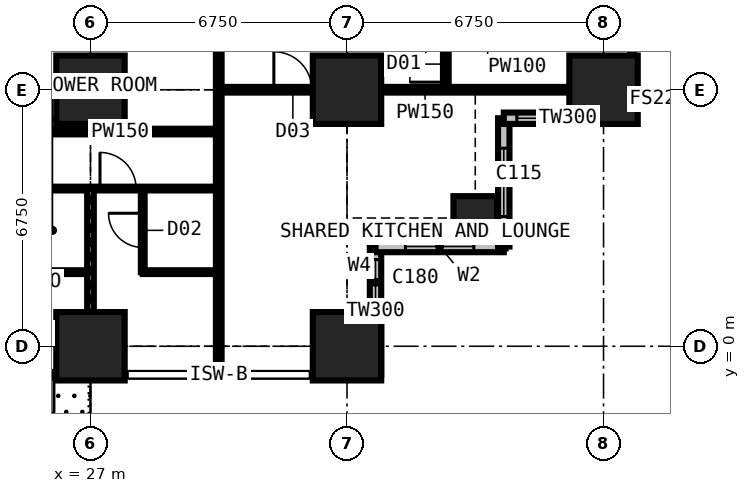
"""IFC4 building model, lengths in metres.
Left out: names, types, materials, properties, quantities, classifications, styles, units other than length and angle.
Written with IfcOpenShell. Run it as: python <this file> out.ifc"""

import sys

from ifc_helpers import new_model, si_unit, direction, frame, frame_2d, origin, origin_2d, place, context, subcontext, project, spatial, rectangle, extrude, element, fill, save


model = new_model("IFC4")
c1 = context("Model", 3, precision=1e-05, world=origin(), true_north=direction((0.0, 1.0)))
c2 = subcontext(c1, "Body", "Model", "MODEL_VIEW")
j1 = project(units=[si_unit("LENGTHUNIT", "METRE"), si_unit("PLANEANGLEUNIT", "RADIAN")], contexts=[c1])
p1 = place(None, origin())
s1 = spatial("IfcSite", under=j1, at=p1, CompositionType="ELEMENT")
p2 = place(p1, origin())
s2 = spatial("IfcBuilding", under=s1, at=p2, CompositionType="ELEMENT")
p3 = place(p2, frame((0.0, 0.0, 105.3)))
s3 = spatial("IfcBuildingStorey", under=s2, at=p3, CompositionType="ELEMENT", Elevation=105.3)
for number, where, z_axis, x_axis in (
    (1, (27.0, 0.0, 0.0), (0.0, 0.0, 1.0), (1.0, 0.0, 0.0)),
    (2, (27.0, 6.75, 0.0), (0.0, 0.0, 1.0), (1.0, 0.0, 0.0)),
    (3, (33.75, 0.0, 0.0), (0.0, 0.0, 1.0), (1.0, 0.0, 0.0)),
    (4, (33.75, 6.75, 0.0), (0.0, 0.0, 1.0), (1.0, 0.0, 0.0)),
):
    element("IfcColumn", number, at=place(p3, frame(where, z_axis=z_axis, x_axis=x_axis)), inside=s3, PredefinedType="COLUMN", context=c2, shape_type="SweptSolid", body=[
        extrude(rectangle(XDim=1.8, YDim=1.8, at=origin_2d()), origin(), (0.0, 0.0, 1.0), 3.6),
    ])
p4 = place(p3, frame((37.125, 3.375, 0.0), z_axis=(0.0, 0.0, 1.0), x_axis=(1.0, 0.0, 0.0)))
e5 = element("IfcColumn", 5, at=p4, inside=s3, PredefinedType="COLUMN", context=c2, shape_type="SweptSolid", body=[
    extrude(rectangle(XDim=1.15, YDim=1.15, at=origin_2d()), origin(), (0.0, 0.0, 1.0), 3.6),
])
p5 = place(p3, frame((40.5, 6.75, 0.0), z_axis=(0.0, 0.0, 1.0), x_axis=(1.0, 0.0, 0.0)))
e6 = element("IfcColumn", 6, at=p5, inside=s3, PredefinedType="COLUMN", context=c2, shape_type="SweptSolid", body=[
    extrude(rectangle(XDim=1.8, YDim=1.8, at=origin_2d()), origin(), (0.0, 0.0, 1.0), 3.6),
])
p6 = place(p3, frame((27.0, -0.75, 0.0), z_axis=(0.0, 0.0, 1.0), x_axis=(-1.0, 0.0, 0.0)))
e7 = element("IfcWall", 7, at=p6, inside=s3, PredefinedType="SOLIDWALL", context=c2, shape_type="SweptSolid", body=[
    extrude(rectangle(XDim=6.75, YDim=0.15, at=frame_2d((3.375, 0.0))), origin(), (0.0, 0.0, 1.0), 3.375),
])
p7 = place(p6, frame((0.962, 0.0, 0.0)))
e8 = element("IfcOpeningElement", 8, at=p7, cuts=e7, PredefinedType="OPENING", context=c2, shape_type="SweptSolid", body=[
    extrude(rectangle(XDim=1.0, YDim=2.2, at=frame_2d((0.5, 1.1))), frame((0.0, 0.085, 0.0), z_axis=(0.0, -1.0, 0.0), x_axis=(1.0, 0.0, 0.0)), (0.0, 0.0, 1.0), 0.17),
])
p8 = place(p6, frame((2.025, 0.0, 0.9)))
e9 = element("IfcOpeningElement", 9, at=p8, cuts=e7, PredefinedType="OPENING", context=c2, shape_type="SweptSolid", body=[
    extrude(rectangle(XDim=1.2, YDim=1.8, at=frame_2d((0.6, 0.9))), frame((0.0, 0.085, 0.0), z_axis=(0.0, -1.0, 0.0), x_axis=(1.0, 0.0, 0.0)), (0.0, 0.0, 1.0), 0.17),
])
p9 = place(p6, frame((4.788, 0.0, 0.0)))
e10 = element("IfcOpeningElement", 10, at=p9, cuts=e7, PredefinedType="OPENING", context=c2, shape_type="SweptSolid", body=[
    extrude(rectangle(XDim=1.0, YDim=2.2, at=frame_2d((0.5, 1.1))), frame((0.0, 0.085, 0.0), z_axis=(0.0, -1.0, 0.0), x_axis=(1.0, 0.0, 0.0)), (0.0, 0.0, 1.0), 0.17),
])
p10 = place(p6, frame((3.525, 0.0, 0.9)))
e11 = element("IfcOpeningElement", 11, at=p10, cuts=e7, PredefinedType="OPENING", context=c2, shape_type="SweptSolid", body=[
    extrude(rectangle(XDim=1.2, YDim=1.8, at=frame_2d((0.6, 0.9))), frame((0.0, 0.085, 0.0), z_axis=(0.0, -1.0, 0.0), x_axis=(1.0, 0.0, 0.0)), (0.0, 0.0, 1.0), 0.17),
])
p11 = place(p3, frame((34.5, -0.75, 0.0), z_axis=(0.0, 0.0, 1.0), x_axis=(0.0, 1.0, 0.0)))
e12 = element("IfcWall", 12, at=p11, inside=s3, PredefinedType="SOLIDWALL", context=c2, shape_type="SweptSolid", body=[
    extrude(rectangle(XDim=3.375, YDim=0.3, at=frame_2d((1.688, 0.0))), origin(), (0.0, 0.0, 1.0), 3.375),
])
p12 = place(p11, frame((1.833, 0.0, 0.9)))
e13 = element("IfcOpeningElement", 13, at=p12, cuts=e12, PredefinedType="OPENING", context=c2, shape_type="SweptSolid", body=[
    extrude(rectangle(XDim=1.2, YDim=1.8, at=frame_2d((0.6, 0.9))), frame((0.0, 0.16, 0.0), z_axis=(0.0, -1.0, 0.0), x_axis=(1.0, 0.0, 0.0)), (0.0, 0.0, 1.0), 0.32),
])
p13 = place(p3, frame((34.5, 2.625, 0.0), z_axis=(0.0, 0.0, 1.0), x_axis=(1.0, 0.0, 0.0)))
e14 = element("IfcWall", 14, at=p13, inside=s3, PredefinedType="SOLIDWALL", context=c2, shape_type="SweptSolid", body=[
    extrude(rectangle(XDim=3.375, YDim=0.3, at=frame_2d((1.688, 0.0))), origin(), (0.0, 0.0, 1.0), 3.375),
])
p14 = place(p13, frame((0.788, 0.0, 0.6)))
e15 = element("IfcOpeningElement", 15, at=p14, cuts=e14, PredefinedType="OPENING", context=c2, shape_type="SweptSolid", body=[
    extrude(rectangle(XDim=1.8, YDim=2.1, at=frame_2d((0.9, 1.05))), frame((0.0, 0.16, 0.0), z_axis=(0.0, -1.0, 0.0), x_axis=(1.0, 0.0, 0.0)), (0.0, 0.0, 1.0), 0.32),
])
p15 = place(p3, frame((37.875, 2.625, 0.0), z_axis=(0.0, 0.0, 1.0), x_axis=(0.0, 1.0, 0.0)))
e16 = element("IfcWall", 16, at=p15, inside=s3, PredefinedType="SOLIDWALL", context=c2, shape_type="SweptSolid", body=[
    extrude(rectangle(XDim=3.375, YDim=0.3, at=frame_2d((1.688, 0.0))), origin(), (0.0, 0.0, 1.0), 3.375),
])
p16 = place(p15, frame((0.788, 0.0, 0.6)))
e17 = element("IfcOpeningElement", 17, at=p16, cuts=e16, PredefinedType="OPENING", context=c2, shape_type="SweptSolid", body=[
    extrude(rectangle(XDim=1.8, YDim=2.1, at=frame_2d((0.9, 1.05))), frame((0.0, 0.16, 0.0), z_axis=(0.0, -1.0, 0.0), x_axis=(1.0, 0.0, 0.0)), (0.0, 0.0, 1.0), 0.32),
])
p17 = place(p3, frame((37.875, 6.0, 0.0), z_axis=(0.0, 0.0, 1.0), x_axis=(1.0, 0.0, 0.0)))
e18 = element("IfcWall", 18, at=p17, inside=s3, PredefinedType="SOLIDWALL", context=c2, shape_type="SweptSolid", body=[
    extrude(rectangle(XDim=3.375, YDim=0.3, at=frame_2d((1.688, 0.0))), origin(), (0.0, 0.0, 1.0), 3.375),
])
p18 = place(p17, frame((0.343, 0.0, 0.9)))
e19 = element("IfcOpeningElement", 19, at=p18, cuts=e18, PredefinedType="OPENING", context=c2, shape_type="SweptSolid", body=[
    extrude(rectangle(XDim=1.2, YDim=1.8, at=frame_2d((0.6, 0.9))), frame((0.0, 0.16, 0.0), z_axis=(0.0, -1.0, 0.0), x_axis=(1.0, 0.0, 0.0)), (0.0, 0.0, 1.0), 0.32),
])
p19 = place(p3, frame((6.75, 4.15, 0.0), z_axis=(0.0, 0.0, 1.0), x_axis=(1.0, 0.0, 0.0)))
e20 = element("IfcWall", 20, at=p19, inside=s3, PredefinedType="PARTITIONING", context=c2, shape_type="SweptSolid", body=[
    extrude(rectangle(XDim=23.625, YDim=0.1, at=frame_2d((11.812, 0.0))), origin(), (0.0, 0.0, 1.0), 3.375),
])
p20 = place(p19, frame((0.2, 0.0, 0.0)))
e21 = element("IfcOpeningElement", 21, at=p20, cuts=e20, PredefinedType="OPENING", context=c2, shape_type="SweptSolid", body=[
    extrude(rectangle(XDim=0.95, YDim=2.2, at=frame_2d((0.475, 1.1))), frame((0.0, 0.06, 0.0), z_axis=(0.0, -1.0, 0.0), x_axis=(1.0, 0.0, 0.0)), (0.0, 0.0, 1.0), 0.12),
])
p21 = place(p19, frame((3.625, 0.0, 0.0)))
e22 = element("IfcOpeningElement", 22, at=p21, cuts=e20, PredefinedType="OPENING", context=c2, shape_type="SweptSolid", body=[
    extrude(rectangle(XDim=0.95, YDim=2.2, at=frame_2d((0.475, 1.1))), frame((0.0, 0.06, 0.0), z_axis=(0.0, -1.0, 0.0), x_axis=(1.0, 0.0, 0.0)), (0.0, 0.0, 1.0), 0.12),
])
p22 = place(p19, frame((6.95, 0.0, 0.0)))
e23 = element("IfcOpeningElement", 23, at=p22, cuts=e20, PredefinedType="OPENING", context=c2, shape_type="SweptSolid", body=[
    extrude(rectangle(XDim=0.95, YDim=2.2, at=frame_2d((0.475, 1.1))), frame((0.0, 0.06, 0.0), z_axis=(0.0, -1.0, 0.0), x_axis=(1.0, 0.0, 0.0)), (0.0, 0.0, 1.0), 0.12),
])
p23 = place(p19, frame((10.375, 0.0, 0.0)))
e24 = element("IfcOpeningElement", 24, at=p23, cuts=e20, PredefinedType="OPENING", context=c2, shape_type="SweptSolid", body=[
    extrude(rectangle(XDim=0.95, YDim=2.2, at=frame_2d((0.475, 1.1))), frame((0.0, 0.06, 0.0), z_axis=(0.0, -1.0, 0.0), x_axis=(1.0, 0.0, 0.0)), (0.0, 0.0, 1.0), 0.12),
])
p24 = place(p19, frame((13.75, 0.0, 0.0)))
e25 = element("IfcOpeningElement", 25, at=p24, cuts=e20, PredefinedType="OPENING", context=c2, shape_type="SweptSolid", body=[
    extrude(rectangle(XDim=0.95, YDim=2.2, at=frame_2d((0.475, 1.1))), frame((0.0, 0.06, 0.0), z_axis=(0.0, -1.0, 0.0), x_axis=(1.0, 0.0, 0.0)), (0.0, 0.0, 1.0), 0.12),
])
p25 = place(p19, frame((17.125, 0.0, 0.0)))
e26 = element("IfcOpeningElement", 26, at=p25, cuts=e20, PredefinedType="OPENING", context=c2, shape_type="SweptSolid", body=[
    extrude(rectangle(XDim=0.95, YDim=2.2, at=frame_2d((0.475, 1.1))), frame((0.0, 0.06, 0.0), z_axis=(0.0, -1.0, 0.0), x_axis=(1.0, 0.0, 0.0)), (0.0, 0.0, 1.0), 0.12),
])
p26 = place(p19, frame((20.5, 0.0, 0.0)))
e27 = element("IfcOpeningElement", 27, at=p26, cuts=e20, PredefinedType="OPENING", context=c2, shape_type="SweptSolid", body=[
    extrude(rectangle(XDim=0.95, YDim=2.2, at=frame_2d((0.475, 1.1))), frame((0.0, 0.06, 0.0), z_axis=(0.0, -1.0, 0.0), x_axis=(1.0, 0.0, 0.0)), (0.0, 0.0, 1.0), 0.12),
])
p27 = place(p3, frame((22.988, 5.65, 0.0), z_axis=(0.0, 0.0, 1.0), x_axis=(1.0, 0.0, 0.0)))
e28 = element("IfcWall", 28, at=p27, inside=s3, PredefinedType="PARTITIONING", context=c2, shape_type="SweptSolid", body=[
    extrude(rectangle(XDim=7.387, YDim=0.15, at=frame_2d((3.694, 0.0))), origin(), (0.0, 0.0, 1.0), 3.375),
])
p28 = place(p27, frame((2.15, 0.0, 0.0)))
e29 = element("IfcOpeningElement", 29, at=p28, cuts=e28, PredefinedType="OPENING", context=c2, shape_type="SweptSolid", body=[
    extrude(rectangle(XDim=0.95, YDim=2.2, at=frame_2d((0.475, 1.1))), frame((0.0, 0.085, 0.0), z_axis=(0.0, -1.0, 0.0), x_axis=(1.0, 0.0, 0.0)), (0.0, 0.0, 1.0), 0.17),
])
p29 = place(p3, frame((25.0, 1.95, 0.0), z_axis=(0.0, 0.0, 1.0), x_axis=(1.0, 0.0, 0.0)))
e30 = element("IfcWall", 30, at=p29, inside=s3, PredefinedType="PARTITIONING", context=c2, shape_type="SweptSolid", body=[
    extrude(rectangle(XDim=2.0, YDim=0.1, at=frame_2d((1.0, 0.0))), origin(), (0.0, 0.0, 1.0), 3.375),
])
p30 = place(p3, frame((27.0, -0.734, 0.0), z_axis=(0.0, 0.0, 1.0), x_axis=(0.0, 1.0, 0.0)))
e31 = element("IfcWall", 31, at=p30, inside=s3, PredefinedType="PARTITIONING", context=c2, shape_type="SweptSolid", body=[
    extrude(rectangle(XDim=4.884, YDim=0.175, at=frame_2d((2.442, 0.0))), origin(), (0.0, 0.0, 1.0), 2.61),
])
p31 = place(p3, frame((28.375, 1.95, 0.0), z_axis=(0.0, 0.0, 1.0), x_axis=(0.0, 1.0, 0.0)))
e32 = element("IfcWall", 32, at=p31, inside=s3, PredefinedType="PARTITIONING", context=c2, shape_type="SweptSolid", body=[
    extrude(rectangle(XDim=2.2, YDim=0.1, at=frame_2d((1.1, 0.0))), origin(), (0.0, 0.0, 1.0), 3.375),
])
p32 = place(p31, frame((0.65, 0.0, 0.0)))
e33 = element("IfcOpeningElement", 33, at=p32, cuts=e32, PredefinedType="OPENING", context=c2, shape_type="SweptSolid", body=[
    extrude(rectangle(XDim=0.9, YDim=2.2, at=frame_2d((0.45, 1.1))), frame((0.0, 0.06, 0.0), z_axis=(0.0, -1.0, 0.0), x_axis=(1.0, 0.0, 0.0)), (0.0, 0.0, 1.0), 0.12),
])
p33 = place(p3, frame((28.375, 1.95, 0.0), z_axis=(0.0, 0.0, 1.0), x_axis=(1.0, 0.0, 0.0)))
e34 = element("IfcWall", 34, at=p33, inside=s3, PredefinedType="PARTITIONING", context=c2, shape_type="SweptSolid", body=[
    extrude(rectangle(XDim=2.0, YDim=0.1, at=frame_2d((1.0, 0.0))), origin(), (0.0, 0.0, 1.0), 3.375),
])
p34 = place(p3, frame((30.375, -0.734, 0.0), z_axis=(0.0, 0.0, 1.0), x_axis=(0.0, 1.0, 0.0)))
e35 = element("IfcWall", 35, at=p34, inside=s3, PredefinedType="PARTITIONING", context=c2, shape_type="SweptSolid", body=[
    extrude(rectangle(XDim=12.034, YDim=0.15, at=frame_2d((6.017, 0.0))), origin(), (0.0, 0.0, 1.0), 3.375),
])
p35 = place(p3, frame((30.375, 6.75, 0.0), z_axis=(0.0, 0.0, 1.0), x_axis=(1.0, 0.0, 0.0)))
e36 = element("IfcWall", 36, at=p35, inside=s3, PredefinedType="PARTITIONING", context=c2, shape_type="SweptSolid", body=[
    extrude(rectangle(XDim=10.859, YDim=0.15, at=frame_2d((5.429, 0.0))), origin(), (0.0, 0.0, 1.0), 2.877),
])
p36 = place(p35, frame((1.45, 0.0, 0.0)))
e37 = element("IfcOpeningElement", 37, at=p36, cuts=e36, PredefinedType="OPENING", context=c2, shape_type="SweptSolid", body=[
    extrude(rectangle(XDim=1.0, YDim=2.2, at=frame_2d((0.5, 1.1))), frame((0.0, 0.085, 0.0), z_axis=(0.0, -1.0, 0.0), x_axis=(1.0, 0.0, 0.0)), (0.0, 0.0, 1.0), 0.17),
])
p37 = place(p3, frame((36.35, 6.75, 0.0), z_axis=(0.0, 0.0, 1.0), x_axis=(0.0, 1.0, 0.0)))
e38 = element("IfcWall", 38, at=p37, inside=s3, PredefinedType="PARTITIONING", context=c2, shape_type="SweptSolid", body=[
    extrude(rectangle(XDim=20.25, YDim=0.15, at=frame_2d((10.125, 0.0))), origin(), (0.0, 0.0, 1.0), 3.375),
])
p38 = place(p37, frame((0.2, 0.0, 0.0)))
e39 = element("IfcOpeningElement", 39, at=p38, cuts=e38, PredefinedType="OPENING", context=c2, shape_type="SweptSolid", body=[
    extrude(rectangle(XDim=0.95, YDim=2.2, at=frame_2d((0.475, 1.1))), frame((0.0, 0.085, 0.0), z_axis=(0.0, -1.0, 0.0), x_axis=(1.0, 0.0, 0.0)), (0.0, 0.0, 1.0), 0.17),
])
p39 = place(p37, frame((15.1, 0.0, 0.0)))
e40 = element("IfcOpeningElement", 40, at=p39, cuts=e38, PredefinedType="OPENING", context=c2, shape_type="SweptSolid", body=[
    extrude(rectangle(XDim=0.95, YDim=2.2, at=frame_2d((0.475, 1.1))), frame((0.0, 0.085, 0.0), z_axis=(0.0, -1.0, 0.0), x_axis=(1.0, 0.0, 0.0)), (0.0, 0.0, 1.0), 0.17),
])
p40 = place(p37, frame((8.35, 0.0, 0.0)))
e41 = element("IfcOpeningElement", 41, at=p40, cuts=e38, PredefinedType="OPENING", context=c2, shape_type="SweptSolid", body=[
    extrude(rectangle(XDim=0.95, YDim=2.2, at=frame_2d((0.475, 1.1))), frame((0.0, 0.085, 0.0), z_axis=(0.0, -1.0, 0.0), x_axis=(1.0, 0.0, 0.0)), (0.0, 0.0, 1.0), 0.17),
])
p41 = place(p37, frame((3.575, 0.0, 0.0)))
e42 = element("IfcOpeningElement", 42, at=p41, cuts=e38, PredefinedType="OPENING", context=c2, shape_type="SweptSolid", body=[
    extrude(rectangle(XDim=0.95, YDim=2.2, at=frame_2d((0.475, 1.1))), frame((0.0, 0.085, 0.0), z_axis=(0.0, -1.0, 0.0), x_axis=(1.0, 0.0, 0.0)), (0.0, 0.0, 1.0), 0.17),
])
p42 = place(p7, origin())
e43 = element("IfcDoor", 43, at=p42, inside=s3, OperationType="SINGLE_SWING_LEFT", PredefinedType="DOOR", context=c2, shape_type="SweptSolid", body=[
    extrude(rectangle(XDim=1.0, YDim=2.2, at=frame_2d((0.5, 1.1))), frame((0.0, 0.025, 0.0), z_axis=(0.0, -1.0, 0.0), x_axis=(1.0, 0.0, 0.0)), (0.0, 0.0, 1.0), 0.05),
])
fill(e8, e43)
p43 = place(p12, origin())
e44 = element("IfcWindow", 44, at=p43, inside=s3, PartitioningType="SINGLE_PANEL", PredefinedType="WINDOW", context=c2, shape_type="SweptSolid", body=[
    extrude(rectangle(XDim=1.2, YDim=1.8, at=frame_2d((0.6, 0.9))), frame((0.0, 0.03, 0.0), z_axis=(0.0, -1.0, 0.0), x_axis=(1.0, 0.0, 0.0)), (0.0, 0.0, 1.0), 0.06),
])
fill(e13, e44)
p44 = place(p14, origin())
e45 = element("IfcWindow", 45, at=p44, inside=s3, PartitioningType="SINGLE_PANEL", PredefinedType="WINDOW", context=c2, shape_type="SweptSolid", body=[
    extrude(rectangle(XDim=1.8, YDim=2.1, at=frame_2d((0.9, 1.05))), frame((0.0, 0.03, 0.0), z_axis=(0.0, -1.0, 0.0), x_axis=(1.0, 0.0, 0.0)), (0.0, 0.0, 1.0), 0.06),
])
fill(e15, e45)
p45 = place(p16, origin())
e46 = element("IfcWindow", 46, at=p45, inside=s3, PartitioningType="SINGLE_PANEL", PredefinedType="WINDOW", context=c2, shape_type="SweptSolid", body=[
    extrude(rectangle(XDim=1.8, YDim=2.1, at=frame_2d((0.9, 1.05))), frame((0.0, 0.03, 0.0), z_axis=(0.0, -1.0, 0.0), x_axis=(1.0, 0.0, 0.0)), (0.0, 0.0, 1.0), 0.06),
])
fill(e17, e46)
p46 = place(p18, origin())
e47 = element("IfcWindow", 47, at=p46, inside=s3, PartitioningType="SINGLE_PANEL", PredefinedType="WINDOW", context=c2, shape_type="SweptSolid", body=[
    extrude(rectangle(XDim=1.2, YDim=1.8, at=frame_2d((0.6, 0.9))), frame((0.0, 0.03, 0.0), z_axis=(0.0, -1.0, 0.0), x_axis=(1.0, 0.0, 0.0)), (0.0, 0.0, 1.0), 0.06),
])
fill(e19, e47)
p47 = place(p26, origin())
e48 = element("IfcDoor", 48, at=p47, inside=s3, OperationType="SINGLE_SWING_LEFT", PredefinedType="DOOR", context=c2, shape_type="SweptSolid", body=[
    extrude(rectangle(XDim=0.95, YDim=2.2, at=frame_2d((0.475, 1.1))), frame((0.0, 0.025, 0.0), z_axis=(0.0, -1.0, 0.0), x_axis=(1.0, 0.0, 0.0)), (0.0, 0.0, 1.0), 0.05),
])
fill(e27, e48)
p48 = place(p32, origin())
e49 = element("IfcDoor", 49, at=p48, inside=s3, OperationType="SINGLE_SWING_RIGHT", PredefinedType="DOOR", context=c2, shape_type="SweptSolid", body=[
    extrude(rectangle(XDim=0.9, YDim=2.2, at=frame_2d((0.45, 1.1))), frame((0.0, 0.025, 0.0), z_axis=(0.0, -1.0, 0.0), x_axis=(1.0, 0.0, 0.0)), (0.0, 0.0, 1.0), 0.05),
])
fill(e33, e49)
p49 = place(p28, origin())
e50 = element("IfcDoor", 50, at=p49, inside=s3, OperationType="SINGLE_SWING_LEFT", PredefinedType="DOOR", context=c2, shape_type="SweptSolid", body=[
    extrude(rectangle(XDim=0.95, YDim=2.2, at=frame_2d((0.475, 1.1))), frame((0.0, 0.025, 0.0), z_axis=(0.0, -1.0, 0.0), x_axis=(1.0, 0.0, 0.0)), (0.0, 0.0, 1.0), 0.05),
])
fill(e29, e50)
p50 = place(p36, origin())
e51 = element("IfcDoor", 51, at=p50, inside=s3, OperationType="SINGLE_SWING_LEFT", PredefinedType="DOOR", context=c2, shape_type="SweptSolid", body=[
    extrude(rectangle(XDim=1.0, YDim=2.2, at=frame_2d((0.5, 1.1))), frame((0.0, 0.025, 0.0), z_axis=(0.0, -1.0, 0.0), x_axis=(1.0, 0.0, 0.0)), (0.0, 0.0, 1.0), 0.05),
])
fill(e37, e51)
p51 = place(p38, origin())
e52 = element("IfcDoor", 52, at=p51, inside=s3, OperationType="SINGLE_SWING_LEFT", PredefinedType="DOOR", context=c2, shape_type="SweptSolid", body=[
    extrude(rectangle(XDim=0.95, YDim=2.2, at=frame_2d((0.475, 1.1))), frame((0.0, 0.025, 0.0), z_axis=(0.0, -1.0, 0.0), x_axis=(1.0, 0.0, 0.0)), (0.0, 0.0, 1.0), 0.05),
])
fill(e39, e52)
save(model, sys.argv[1])
